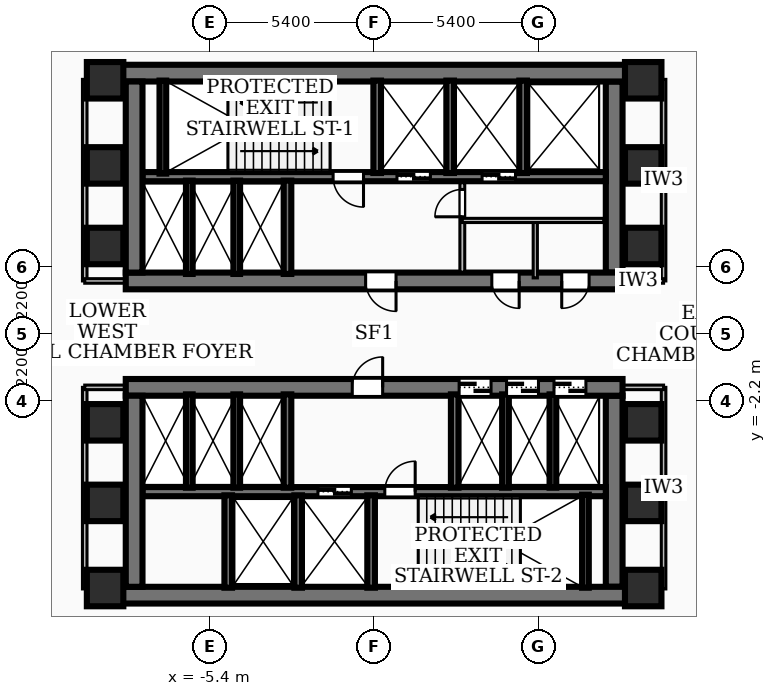
"""IFC4 building model, lengths in metres.
Left out: names, types, materials, properties, quantities, classifications, styles, units other than length and angle.
Written with IfcOpenShell. Run it as: python <this file> out.ifc"""

import sys

from ifc_helpers import new_model, si_unit, direction, frame, frame_2d, origin, origin_2d, place, context, subcontext, project, spatial, rectangle, extrude, element, fill, save


model = new_model("IFC4")
c1 = context("Model", 3, precision=1e-05, world=origin(), true_north=direction((0.0, 1.0)))
c2 = subcontext(c1, "Body", "Model", "MODEL_VIEW")
j1 = project(units=[si_unit("LENGTHUNIT", "METRE"), si_unit("PLANEANGLEUNIT", "RADIAN")], contexts=[c1])
p1 = place(None, origin())
s1 = spatial("IfcSite", under=j1, at=p1, CompositionType="ELEMENT")
p2 = place(p1, origin())
s2 = spatial("IfcBuilding", under=s1, at=p2, CompositionType="ELEMENT")
p3 = place(p2, frame((0.0, 0.0, 10.08)))
s3 = spatial("IfcBuildingStorey", under=s2, at=p3, CompositionType="ELEMENT", Elevation=10.08)
p4 = place(p3, frame((-8.78, 8.585, 0.0), z_axis=(0.0, 0.0, 1.0), x_axis=(1.0, 0.0, 0.0)))
e1 = element("IfcWall", 1, at=p4, inside=s3, PredefinedType="SHEAR", context=c2, shape_type="SweptSolid", body=[
    extrude(rectangle(XDim=17.56, YDim=0.55, at=frame_2d((8.78, 0.0))), origin(), (0.0, 0.0, 1.0), 4.36),
])
p5 = place(p3, frame((8.17, 1.75, 0.0), z_axis=(0.0, 0.0, 1.0), x_axis=(-1.0, 0.0, 0.0)))
e2 = element("IfcWall", 2, at=p5, inside=s3, PredefinedType="SHEAR", context=c2, shape_type="SweptSolid", body=[
    extrude(rectangle(XDim=16.34, YDim=0.55, at=frame_2d((8.17, 0.0))), origin(), (0.0, 0.0, 1.0), 4.36),
])
p6 = place(p5, frame((7.45, 0.0, 0.0)))
e3 = element("IfcOpeningElement", 3, at=p6, cuts=e2, PredefinedType="OPENING", context=c2, shape_type="SweptSolid", body=[
    extrude(rectangle(XDim=1.0, YDim=2.1, at=frame_2d((0.5, 1.05))), frame((0.0, 0.285, 0.0), z_axis=(0.0, -1.0, 0.0), x_axis=(1.0, 0.0, 0.0)), (0.0, 0.0, 1.0), 0.57),
])
p7 = place(p5, frame((3.4, 0.0, 0.0)))
e4 = element("IfcOpeningElement", 4, at=p7, cuts=e2, PredefinedType="OPENING", context=c2, shape_type="SweptSolid", body=[
    extrude(rectangle(XDim=0.9, YDim=2.06, at=frame_2d((0.45, 1.03))), frame((0.0, 0.285, 0.0), z_axis=(0.0, -1.0, 0.0), x_axis=(1.0, 0.0, 0.0)), (0.0, 0.0, 1.0), 0.57),
])
p8 = place(p5, frame((1.1, 0.0, 0.0)))
e5 = element("IfcOpeningElement", 5, at=p8, cuts=e2, PredefinedType="OPENING", context=c2, shape_type="SweptSolid", body=[
    extrude(rectangle(XDim=0.9, YDim=2.06, at=frame_2d((0.45, 1.03))), frame((0.0, 0.285, 0.0), z_axis=(0.0, -1.0, 0.0), x_axis=(1.0, 0.0, 0.0)), (0.0, 0.0, 1.0), 0.57),
])
for number, where, z_axis, x_axis in (
    (6, (-7.895, 2.025, 0.0), (0.0, 0.0, 1.0), (0.0, 1.0, 0.0)),
    (7, (7.895, 8.31, 0.0), (0.0, 0.0, 1.0), (0.0, -1.0, 0.0)),
):
    element("IfcWall", number, at=place(p3, frame(where, z_axis=z_axis, x_axis=x_axis)), inside=s3, PredefinedType="SHEAR", context=c2, shape_type="SweptSolid", body=[
        extrude(rectangle(XDim=6.285, YDim=0.55, at=frame_2d((3.143, 0.0))), origin(), (0.0, 0.0, 1.0), 4.36),
    ])
p9 = place(p3, frame((7.62, 5.18, 0.0), z_axis=(0.0, 0.0, 1.0), x_axis=(-1.0, 0.0, 0.0)))
e8 = element("IfcWall", 8, at=p9, inside=s3, PredefinedType="SOLIDWALL", context=c2, shape_type="SweptSolid", body=[
    extrude(rectangle(XDim=15.24, YDim=0.3, at=frame_2d((7.62, 0.0))), origin(), (0.0, 0.0, 1.0), 4.36),
])
p10 = place(p9, frame((5.77, 0.0, 0.0)))
e9 = element("IfcOpeningElement", 9, at=p10, cuts=e8, PredefinedType="OPENING", context=c2, shape_type="SweptSolid", body=[
    extrude(rectangle(XDim=1.1, YDim=2.15, at=frame_2d((0.55, 1.075))), frame((0.0, 0.16, 0.0), z_axis=(0.0, -1.0, 0.0), x_axis=(1.0, 0.0, 0.0)), (0.0, 0.0, 1.0), 0.32),
])
p11 = place(p9, frame((2.97, 0.0, 0.0)))
e10 = element("IfcOpeningElement", 10, at=p11, cuts=e8, PredefinedType="OPENING", context=c2, shape_type="SweptSolid", body=[
    extrude(rectangle(XDim=1.1, YDim=2.15, at=frame_2d((0.55, 1.075))), frame((0.0, 0.16, 0.0), z_axis=(0.0, -1.0, 0.0), x_axis=(1.0, 0.0, 0.0)), (0.0, 0.0, 1.0), 0.32),
])
p12 = place(p9, frame((7.97, 0.0, 0.0)))
e11 = element("IfcOpeningElement", 11, at=p12, cuts=e8, PredefinedType="OPENING", context=c2, shape_type="SweptSolid", body=[
    extrude(rectangle(XDim=1.0, YDim=2.1, at=frame_2d((0.5, 1.05))), frame((0.0, 0.16, 0.0), z_axis=(0.0, -1.0, 0.0), x_axis=(1.0, 0.0, 0.0)), (0.0, 0.0, 1.0), 0.32),
])
p13 = place(p3, frame((8.78, -8.585, 0.0), z_axis=(0.0, 0.0, 1.0), x_axis=(-1.0, 0.0, 0.0)))
e12 = element("IfcWall", 12, at=p13, inside=s3, PredefinedType="SHEAR", context=c2, shape_type="SweptSolid", body=[
    extrude(rectangle(XDim=17.56, YDim=0.55, at=frame_2d((8.78, 0.0))), origin(), (0.0, 0.0, 1.0), 4.36),
])
p14 = place(p3, frame((-8.17, -1.75, 0.0), z_axis=(0.0, 0.0, 1.0), x_axis=(1.0, 0.0, 0.0)))
e13 = element("IfcWall", 13, at=p14, inside=s3, PredefinedType="SHEAR", context=c2, shape_type="SweptSolid", body=[
    extrude(rectangle(XDim=16.34, YDim=0.55, at=frame_2d((8.17, 0.0))), origin(), (0.0, 0.0, 1.0), 4.36),
])
p15 = place(p14, frame((7.45, 0.0, 0.0)))
e14 = element("IfcOpeningElement", 14, at=p15, cuts=e13, PredefinedType="OPENING", context=c2, shape_type="SweptSolid", body=[
    extrude(rectangle(XDim=1.0, YDim=2.1, at=frame_2d((0.5, 1.05))), frame((0.0, 0.285, 0.0), z_axis=(0.0, -1.0, 0.0), x_axis=(1.0, 0.0, 0.0)), (0.0, 0.0, 1.0), 0.57),
])
p16 = place(p14, frame((10.965, 0.0, 0.0)))
e15 = element("IfcOpeningElement", 15, at=p16, cuts=e13, PredefinedType="OPENING", context=c2, shape_type="SweptSolid", body=[
    extrude(rectangle(XDim=1.05, YDim=2.15, at=frame_2d((0.525, 1.075))), frame((0.0, 0.285, 0.0), z_axis=(0.0, -1.0, 0.0), x_axis=(1.0, 0.0, 0.0)), (0.0, 0.0, 1.0), 0.57),
])
p17 = place(p14, frame((12.525, 0.0, 0.0)))
e16 = element("IfcOpeningElement", 16, at=p17, cuts=e13, PredefinedType="OPENING", context=c2, shape_type="SweptSolid", body=[
    extrude(rectangle(XDim=1.05, YDim=2.15, at=frame_2d((0.525, 1.075))), frame((0.0, 0.285, 0.0), z_axis=(0.0, -1.0, 0.0), x_axis=(1.0, 0.0, 0.0)), (0.0, 0.0, 1.0), 0.57),
])
p18 = place(p14, frame((14.085, 0.0, 0.0)))
e17 = element("IfcOpeningElement", 17, at=p18, cuts=e13, PredefinedType="OPENING", context=c2, shape_type="SweptSolid", body=[
    extrude(rectangle(XDim=1.05, YDim=2.15, at=frame_2d((0.525, 1.075))), frame((0.0, 0.285, 0.0), z_axis=(0.0, -1.0, 0.0), x_axis=(1.0, 0.0, 0.0)), (0.0, 0.0, 1.0), 0.57),
])
for number, where, z_axis, x_axis in (
    (18, (-7.895, -8.31, 0.0), (0.0, 0.0, 1.0), (0.0, 1.0, 0.0)),
    (19, (7.895, -2.025, 0.0), (0.0, 0.0, 1.0), (0.0, -1.0, 0.0)),
):
    element("IfcWall", number, at=place(p3, frame(where, z_axis=z_axis, x_axis=x_axis)), inside=s3, PredefinedType="SHEAR", context=c2, shape_type="SweptSolid", body=[
        extrude(rectangle(XDim=6.285, YDim=0.55, at=frame_2d((3.143, 0.0))), origin(), (0.0, 0.0, 1.0), 4.36),
    ])
p19 = place(p3, frame((-7.62, -5.18, 0.0), z_axis=(0.0, 0.0, 1.0), x_axis=(1.0, 0.0, 0.0)))
e20 = element("IfcWall", 20, at=p19, inside=s3, PredefinedType="SOLIDWALL", context=c2, shape_type="SweptSolid", body=[
    extrude(rectangle(XDim=15.24, YDim=0.3, at=frame_2d((7.62, 0.0))), origin(), (0.0, 0.0, 1.0), 4.36),
])
p20 = place(p19, frame((5.77, 0.0, 0.0)))
e21 = element("IfcOpeningElement", 21, at=p20, cuts=e20, PredefinedType="OPENING", context=c2, shape_type="SweptSolid", body=[
    extrude(rectangle(XDim=1.1, YDim=2.15, at=frame_2d((0.55, 1.075))), frame((0.0, 0.16, 0.0), z_axis=(0.0, -1.0, 0.0), x_axis=(1.0, 0.0, 0.0)), (0.0, 0.0, 1.0), 0.32),
])
p21 = place(p19, frame((7.97, 0.0, 0.0)))
e22 = element("IfcOpeningElement", 22, at=p21, cuts=e20, PredefinedType="OPENING", context=c2, shape_type="SweptSolid", body=[
    extrude(rectangle(XDim=1.0, YDim=2.1, at=frame_2d((0.5, 1.05))), frame((0.0, 0.16, 0.0), z_axis=(0.0, -1.0, 0.0), x_axis=(1.0, 0.0, 0.0)), (0.0, 0.0, 1.0), 0.32),
])
for number, where, z_axis, x_axis in (
    (23, (-6.95, 5.28, 0.0), (0.0, 0.0, 1.0), (0.0, 1.0, 0.0)),
    (24, (6.95, -8.34, 0.0), (0.0, 0.0, 1.0), (0.0, 1.0, 0.0)),
):
    element("IfcWall", number, at=place(p3, frame(where, z_axis=z_axis, x_axis=x_axis)), inside=s3, PredefinedType="SOLIDWALL", context=c2, shape_type="SweptSolid", body=[
        extrude(rectangle(XDim=3.06, YDim=0.22, at=frame_2d((1.53, 0.0))), origin(), (0.0, 0.0, 1.0), 4.36),
    ])
for number, where, z_axis, x_axis in (
    (25, (0.1, 5.3, 0.0), (0.0, 0.0, 1.0), (0.0, 1.0, 0.0)),
    (26, (2.5, 5.3, 0.0), (0.0, 0.0, 1.0), (0.0, 1.0, 0.0)),
    (27, (4.9, 5.3, 0.0), (0.0, 0.0, 1.0), (0.0, 1.0, 0.0)),
):
    element("IfcWall", number, at=place(p3, frame(where, z_axis=z_axis, x_axis=x_axis)), inside=s3, PredefinedType="SOLIDWALL", context=c2, shape_type="SweptSolid", body=[
        extrude(rectangle(XDim=3.04, YDim=0.25, at=frame_2d((1.52, 0.0))), origin(), (0.0, 0.0, 1.0), 4.36),
    ])
p22 = place(p3, frame((-2.85, 1.98, 0.0), z_axis=(0.0, 0.0, 1.0), x_axis=(0.0, 1.0, 0.0)))
e28 = element("IfcWall", 28, at=p22, inside=s3, PredefinedType="SOLIDWALL", context=c2, shape_type="SweptSolid", body=[
    extrude(rectangle(XDim=3.07, YDim=0.25, at=frame_2d((1.535, 0.0))), origin(), (0.0, 0.0, 1.0), 4.36),
])
for number, where, z_axis, x_axis in (
    (29, (-0.1, -8.34, 0.0), (0.0, 0.0, 1.0), (0.0, 1.0, 0.0)),
    (30, (-2.5, -8.34, 0.0), (0.0, 0.0, 1.0), (0.0, 1.0, 0.0)),
    (31, (-4.8, -8.34, 0.0), (0.0, 0.0, 1.0), (0.0, 1.0, 0.0)),
):
    element("IfcWall", number, at=place(p3, frame(where, z_axis=z_axis, x_axis=x_axis)), inside=s3, PredefinedType="SOLIDWALL", context=c2, shape_type="SweptSolid", body=[
        extrude(rectangle(XDim=3.04, YDim=0.25, at=frame_2d((1.52, 0.0))), origin(), (0.0, 0.0, 1.0), 4.36),
    ])
for number, where, z_axis, x_axis in (
    (32, (-2.85, -5.05, 0.0), (0.0, 0.0, 1.0), (0.0, 1.0, 0.0)),
    (33, (2.65, -5.05, 0.0), (0.0, 0.0, 1.0), (0.0, 1.0, 0.0)),
):
    element("IfcWall", number, at=place(p3, frame(where, z_axis=z_axis, x_axis=x_axis)), inside=s3, PredefinedType="SOLIDWALL", context=c2, shape_type="SweptSolid", body=[
        extrude(rectangle(XDim=3.07, YDim=0.25, at=frame_2d((1.535, 0.0))), origin(), (0.0, 0.0, 1.0), 4.36),
    ])
for number, where, z_axis, x_axis in (
    (34, (-6.08, 1.98, 0.0), (0.0, 0.0, 1.0), (0.0, 1.0, 0.0)),
    (35, (-4.52, 1.98, 0.0), (0.0, 0.0, 1.0), (0.0, 1.0, 0.0)),
    (36, (4.32, -5.05, 0.0), (0.0, 0.0, 1.0), (0.0, 1.0, 0.0)),
    (37, (5.88, -5.05, 0.0), (0.0, 0.0, 1.0), (0.0, 1.0, 0.0)),
    (38, (-6.08, -5.05, 0.0), (0.0, 0.0, 1.0), (0.0, 1.0, 0.0)),
    (39, (-4.52, -5.05, 0.0), (0.0, 0.0, 1.0), (0.0, 1.0, 0.0)),
):
    element("IfcWall", number, at=place(p3, frame(where, z_axis=z_axis, x_axis=x_axis)), inside=s3, PredefinedType="SOLIDWALL", context=c2, shape_type="SweptSolid", body=[
        extrude(rectangle(XDim=3.07, YDim=0.22, at=frame_2d((1.535, 0.0))), origin(), (0.0, 0.0, 1.0), 4.36),
    ])
for number, where, z_axis, x_axis in (
    (40, (-8.85, -5.55, 0.0), (0.0, 0.0, 1.0), (1.0, 0.0, 0.0)),
    (41, (-8.85, -2.9, 0.0), (0.0, 0.0, 1.0), (1.0, 0.0, 0.0)),
    (42, (-8.85, 2.9, 0.0), (0.0, 0.0, 1.0), (1.0, 0.0, 0.0)),
    (43, (-8.85, 5.55, 0.0), (0.0, 0.0, 1.0), (1.0, 0.0, 0.0)),
    (44, (8.85, -5.55, 0.0), (0.0, 0.0, 1.0), (1.0, 0.0, 0.0)),
    (45, (8.85, -2.9, 0.0), (0.0, 0.0, 1.0), (1.0, 0.0, 0.0)),
    (46, (8.85, 2.9, 0.0), (0.0, 0.0, 1.0), (1.0, 0.0, 0.0)),
    (47, (8.85, 5.55, 0.0), (0.0, 0.0, 1.0), (1.0, 0.0, 0.0)),
    (48, (-8.85, 8.35, 0.0), (0.0, 0.0, 1.0), (1.0, 0.0, 0.0)),
    (49, (8.85, -8.35, 0.0), (0.0, 0.0, 1.0), (1.0, 0.0, 0.0)),
    (50, (8.85, 8.35, 0.0), (0.0, 0.0, 1.0), (1.0, 0.0, 0.0)),
    (51, (-8.85, -8.35, 0.0), (0.0, 0.0, 1.0), (1.0, 0.0, 0.0)),
):
    element("IfcColumn", number, at=place(p3, frame(where, z_axis=z_axis, x_axis=x_axis)), inside=s3, PredefinedType="COLUMN", context=c2, shape_type="SweptSolid", body=[
        extrude(rectangle(XDim=1.2, YDim=1.2, at=origin_2d()), origin(), (0.0, 0.0, 1.0), 4.68),
    ])
p23 = place(p3, frame((2.9, 2.04, 0.0), z_axis=(0.0, 0.0, 1.0), x_axis=(0.0, 1.0, 0.0)))
e52 = element("IfcWall", 52, at=p23, inside=s3, PredefinedType="PARTITIONING", context=c2, shape_type="SweptSolid", body=[
    extrude(rectangle(XDim=2.94, YDim=0.16, at=frame_2d((1.47, 0.0))), origin(), (0.0, 0.0, 1.0), 3.425),
])
p24 = place(p23, frame((1.82, 0.0, 0.0)))
e53 = element("IfcOpeningElement", 53, at=p24, cuts=e52, PredefinedType="OPENING", context=c2, shape_type="SweptSolid", body=[
    extrude(rectangle(XDim=0.9, YDim=2.06, at=frame_2d((0.45, 1.03))), frame((0.0, 0.09, 0.0), z_axis=(0.0, -1.0, 0.0), x_axis=(1.0, 0.0, 0.0)), (0.0, 0.0, 1.0), 0.18),
])
p25 = place(p3, frame((2.9, 3.74, 0.0), z_axis=(0.0, 0.0, 1.0), x_axis=(1.0, 0.0, 0.0)))
e54 = element("IfcWall", 54, at=p25, inside=s3, PredefinedType="PARTITIONING", context=c2, shape_type="SweptSolid", body=[
    extrude(rectangle(XDim=4.65, YDim=0.138, at=frame_2d((2.325, 0.0))), origin(), (0.0, 0.0, 1.0), 4.36),
])
p26 = place(p3, frame((5.3, 1.85, 0.0), z_axis=(0.0, 0.0, 1.0), x_axis=(0.0, 1.0, 0.0)))
e55 = element("IfcWall", 55, at=p26, inside=s3, PredefinedType="PARTITIONING", context=c2, shape_type="SweptSolid", body=[
    extrude(rectangle(XDim=1.89, YDim=0.138, at=frame_2d((0.945, 0.0))), origin(), (0.0, 0.0, 1.0), 3.425),
])
p27 = place(p3, frame((-9.52, 1.75, 0.0), z_axis=(0.0, 0.0, 1.0), x_axis=(0.0, 1.0, 0.0)))
e56 = element("IfcWall", 56, at=p27, inside=s3, PredefinedType="PARTITIONING", context=c2, shape_type="SweptSolid", body=[
    extrude(rectangle(XDim=6.63, YDim=0.15, at=frame_2d((3.315, 0.0))), origin(), (0.0, 0.0, 1.0), 3.37),
])
p28 = place(p3, frame((-7.85, 1.75, 0.0), z_axis=(0.0, 0.0, 1.0), x_axis=(-1.0, 0.0, 0.0)))
e57 = element("IfcWall", 57, at=p28, inside=s3, PredefinedType="PARTITIONING", context=c2, shape_type="SweptSolid", body=[
    extrude(rectangle(XDim=1.67, YDim=0.15, at=frame_2d((0.835, 0.0))), origin(), (0.0, 0.0, 1.0), 3.425),
])
p29 = place(p3, frame((-9.52, -8.38, 0.0), z_axis=(0.0, 0.0, 1.0), x_axis=(0.0, 1.0, 0.0)))
e58 = element("IfcWall", 58, at=p29, inside=s3, PredefinedType="PARTITIONING", context=c2, shape_type="SweptSolid", body=[
    extrude(rectangle(XDim=6.63, YDim=0.15, at=frame_2d((3.315, 0.0))), origin(), (0.0, 0.0, 1.0), 3.37),
])
p30 = place(p3, frame((-7.85, -1.75, 0.0), z_axis=(0.0, 0.0, 1.0), x_axis=(-1.0, 0.0, 0.0)))
e59 = element("IfcWall", 59, at=p30, inside=s3, PredefinedType="PARTITIONING", context=c2, shape_type="SweptSolid", body=[
    extrude(rectangle(XDim=1.67, YDim=0.15, at=frame_2d((0.835, 0.0))), origin(), (0.0, 0.0, 1.0), 3.425),
])
p31 = place(p3, frame((9.52, 1.75, 0.0), z_axis=(0.0, 0.0, 1.0), x_axis=(0.0, 1.0, 0.0)))
e60 = element("IfcWall", 60, at=p31, inside=s3, PredefinedType="PARTITIONING", context=c2, shape_type="SweptSolid", body=[
    extrude(rectangle(XDim=6.63, YDim=0.15, at=frame_2d((3.315, 0.0))), origin(), (0.0, 0.0, 1.0), 3.37),
])
p32 = place(p3, frame((7.85, 1.75, 0.0), z_axis=(0.0, 0.0, 1.0), x_axis=(1.0, 0.0, 0.0)))
e61 = element("IfcWall", 61, at=p32, inside=s3, PredefinedType="PARTITIONING", context=c2, shape_type="SweptSolid", body=[
    extrude(rectangle(XDim=1.67, YDim=0.15, at=frame_2d((0.835, 0.0))), origin(), (0.0, 0.0, 1.0), 3.425),
])
p33 = place(p3, frame((9.52, -8.38, 0.0), z_axis=(0.0, 0.0, 1.0), x_axis=(0.0, 1.0, 0.0)))
e62 = element("IfcWall", 62, at=p33, inside=s3, PredefinedType="PARTITIONING", context=c2, shape_type="SweptSolid", body=[
    extrude(rectangle(XDim=6.63, YDim=0.15, at=frame_2d((3.315, 0.0))), origin(), (0.0, 0.0, 1.0), 3.37),
])
p34 = place(p3, frame((7.85, -1.75, 0.0), z_axis=(0.0, 0.0, 1.0), x_axis=(1.0, 0.0, 0.0)))
e63 = element("IfcWall", 63, at=p34, inside=s3, PredefinedType="PARTITIONING", context=c2, shape_type="SweptSolid", body=[
    extrude(rectangle(XDim=1.67, YDim=0.15, at=frame_2d((0.835, 0.0))), origin(), (0.0, 0.0, 1.0), 3.425),
])
p35 = place(p6, origin())
e64 = element("IfcDoor", 64, at=p35, inside=s3, OperationType="SINGLE_SWING_LEFT", PredefinedType="DOOR", context=c2, shape_type="SweptSolid", body=[
    extrude(rectangle(XDim=1.0, YDim=2.1, at=frame_2d((0.5, 1.05))), frame((0.0, 0.025, 0.0), z_axis=(0.0, -1.0, 0.0), x_axis=(1.0, 0.0, 0.0)), (0.0, 0.0, 1.0), 0.05),
])
fill(e3, e64)
p36 = place(p15, origin())
e65 = element("IfcDoor", 65, at=p36, inside=s3, OperationType="SINGLE_SWING_RIGHT", PredefinedType="DOOR", context=c2, shape_type="SweptSolid", body=[
    extrude(rectangle(XDim=1.0, YDim=2.1, at=frame_2d((0.5, 1.05))), frame((0.0, 0.025, 0.0), z_axis=(0.0, -1.0, 0.0), x_axis=(1.0, 0.0, 0.0)), (0.0, 0.0, 1.0), 0.05),
])
fill(e14, e65)
p37 = place(p10, origin())
e66 = element("IfcDoor", 66, at=p37, inside=s3, OperationType="DOUBLE_DOOR_SLIDING", PredefinedType="DOOR", context=c2, shape_type="SweptSolid", body=[
    extrude(rectangle(XDim=1.1, YDim=2.15, at=frame_2d((0.55, 1.075))), frame((0.0, 0.025, 0.0), z_axis=(0.0, -1.0, 0.0), x_axis=(1.0, 0.0, 0.0)), (0.0, 0.0, 1.0), 0.05),
])
fill(e9, e66)
p38 = place(p11, origin())
e67 = element("IfcDoor", 67, at=p38, inside=s3, OperationType="DOUBLE_DOOR_SLIDING", PredefinedType="DOOR", context=c2, shape_type="SweptSolid", body=[
    extrude(rectangle(XDim=1.1, YDim=2.15, at=frame_2d((0.55, 1.075))), frame((0.0, 0.025, 0.0), z_axis=(0.0, -1.0, 0.0), x_axis=(1.0, 0.0, 0.0)), (0.0, 0.0, 1.0), 0.05),
])
fill(e10, e67)
p39 = place(p12, origin())
e68 = element("IfcDoor", 68, at=p39, inside=s3, OperationType="SINGLE_SWING_LEFT", PredefinedType="DOOR", context=c2, shape_type="SweptSolid", body=[
    extrude(rectangle(XDim=1.0, YDim=2.1, at=frame_2d((0.5, 1.05))), frame((0.0, 0.025, 0.0), z_axis=(0.0, -1.0, 0.0), x_axis=(1.0, 0.0, 0.0)), (0.0, 0.0, 1.0), 0.05),
])
fill(e11, e68)
p40 = place(p20, origin())
e69 = element("IfcDoor", 69, at=p40, inside=s3, OperationType="DOUBLE_DOOR_SLIDING", PredefinedType="DOOR", context=c2, shape_type="SweptSolid", body=[
    extrude(rectangle(XDim=1.1, YDim=2.15, at=frame_2d((0.55, 1.075))), frame((0.0, 0.025, 0.0), z_axis=(0.0, -1.0, 0.0), x_axis=(1.0, 0.0, 0.0)), (0.0, 0.0, 1.0), 0.05),
])
fill(e21, e69)
p41 = place(p21, origin())
e70 = element("IfcDoor", 70, at=p41, inside=s3, OperationType="SINGLE_SWING_RIGHT", PredefinedType="DOOR", context=c2, shape_type="SweptSolid", body=[
    extrude(rectangle(XDim=1.0, YDim=2.1, at=frame_2d((0.5, 1.05))), frame((0.0, 0.025, 0.0), z_axis=(0.0, -1.0, 0.0), x_axis=(1.0, 0.0, 0.0)), (0.0, 0.0, 1.0), 0.05),
])
fill(e22, e70)
p42 = place(p16, origin())
e71 = element("IfcDoor", 71, at=p42, inside=s3, OperationType="DOUBLE_DOOR_SLIDING", PredefinedType="DOOR", context=c2, shape_type="SweptSolid", body=[
    extrude(rectangle(XDim=1.05, YDim=2.15, at=frame_2d((0.525, 1.075))), frame((0.0, 0.025, 0.0), z_axis=(0.0, -1.0, 0.0), x_axis=(1.0, 0.0, 0.0)), (0.0, 0.0, 1.0), 0.05),
])
fill(e15, e71)
p43 = place(p17, origin())
e72 = element("IfcDoor", 72, at=p43, inside=s3, OperationType="DOUBLE_DOOR_SLIDING", PredefinedType="DOOR", context=c2, shape_type="SweptSolid", body=[
    extrude(rectangle(XDim=1.05, YDim=2.15, at=frame_2d((0.525, 1.075))), frame((0.0, 0.025, 0.0), z_axis=(0.0, -1.0, 0.0), x_axis=(1.0, 0.0, 0.0)), (0.0, 0.0, 1.0), 0.05),
])
fill(e16, e72)
p44 = place(p18, origin())
e73 = element("IfcDoor", 73, at=p44, inside=s3, OperationType="DOUBLE_DOOR_SLIDING", PredefinedType="DOOR", context=c2, shape_type="SweptSolid", body=[
    extrude(rectangle(XDim=1.05, YDim=2.15, at=frame_2d((0.525, 1.075))), frame((0.0, 0.025, 0.0), z_axis=(0.0, -1.0, 0.0), x_axis=(1.0, 0.0, 0.0)), (0.0, 0.0, 1.0), 0.05),
])
fill(e17, e73)
p45 = place(p7, origin())
e74 = element("IfcDoor", 74, at=p45, inside=s3, OperationType="SINGLE_SWING_LEFT", PredefinedType="DOOR", context=c2, shape_type="SweptSolid", body=[
    extrude(rectangle(XDim=0.9, YDim=2.06, at=frame_2d((0.45, 1.03))), frame((0.0, 0.025, 0.0), z_axis=(0.0, -1.0, 0.0), x_axis=(1.0, 0.0, 0.0)), (0.0, 0.0, 1.0), 0.05),
])
fill(e4, e74)
p46 = place(p8, origin())
e75 = element("IfcDoor", 75, at=p46, inside=s3, OperationType="SINGLE_SWING_RIGHT", PredefinedType="DOOR", context=c2, shape_type="SweptSolid", body=[
    extrude(rectangle(XDim=0.9, YDim=2.06, at=frame_2d((0.45, 1.03))), frame((0.0, 0.025, 0.0), z_axis=(0.0, -1.0, 0.0), x_axis=(1.0, 0.0, 0.0)), (0.0, 0.0, 1.0), 0.05),
])
fill(e5, e75)
p47 = place(p24, origin())
e76 = element("IfcDoor", 76, at=p47, inside=s3, OperationType="SINGLE_SWING_LEFT", PredefinedType="DOOR", context=c2, shape_type="SweptSolid", body=[
    extrude(rectangle(XDim=0.9, YDim=2.06, at=frame_2d((0.45, 1.03))), frame((0.0, 0.025, 0.0), z_axis=(0.0, -1.0, 0.0), x_axis=(1.0, 0.0, 0.0)), (0.0, 0.0, 1.0), 0.05),
])
fill(e53, e76)
save(model, sys.argv[1])
